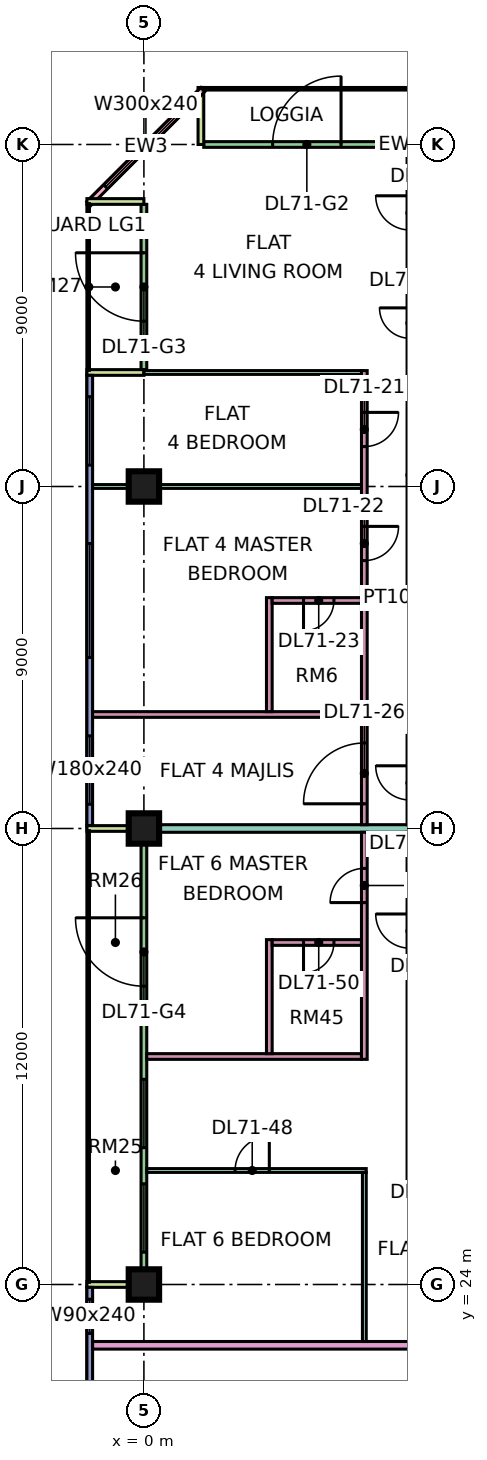
"""IFC4 building model, lengths in metres.
Left out: names, types, materials, properties, quantities, classifications, styles, units other than length and angle.
Written with IfcOpenShell. Run it as: python <this file> out.ifc"""

import sys

from ifc_helpers import new_model, si_unit, direction, frame, frame_2d, origin, origin_2d, place, context, subcontext, project, spatial, rectangle, extrude, element, fill, save


model = new_model("IFC4")
c1 = context("Model", 3, precision=1e-05, world=origin(), true_north=direction((0.0, 1.0)))
c2 = subcontext(c1, "Body", "Model", "MODEL_VIEW")
j1 = project(units=[si_unit("LENGTHUNIT", "METRE"), si_unit("PLANEANGLEUNIT", "RADIAN")], contexts=[c1])
p1 = place(None, origin())
s1 = spatial("IfcSite", under=j1, at=p1, CompositionType="ELEMENT")
p2 = place(p1, origin())
s2 = spatial("IfcBuilding", under=s1, at=p2, CompositionType="ELEMENT")
p3 = place(p2, frame((0.0, 0.0, 303.4)))
s3 = spatial("IfcBuildingStorey", under=s2, at=p3, CompositionType="ELEMENT", Elevation=303.4)
p4 = place(p3, frame((0.0, 24.0, 0.0), z_axis=(0.0, 0.0, 1.0), x_axis=(1.0, 0.0, 0.0)))
e1 = element("IfcColumn", 1, at=p4, inside=s3, PredefinedType="COLUMN", context=c2, shape_type="SweptSolid", body=[
    extrude(rectangle(XDim=0.8, YDim=0.8, at=origin_2d()), origin(), (0.0, 0.0, 1.0), 3.75),
])
p5 = place(p3, frame((0.0, 36.0, 0.0), z_axis=(0.0, 0.0, 1.0), x_axis=(1.0, 0.0, 0.0)))
e2 = element("IfcColumn", 2, at=p5, inside=s3, PredefinedType="COLUMN", context=c2, shape_type="SweptSolid", body=[
    extrude(rectangle(XDim=0.8, YDim=0.8, at=origin_2d()), origin(), (0.0, 0.0, 1.0), 3.75),
])
p6 = place(p3, frame((0.0, 45.0, 0.0), z_axis=(0.0, 0.0, 1.0), x_axis=(1.0, 0.0, 0.0)))
e3 = element("IfcColumn", 3, at=p6, inside=s3, PredefinedType="COLUMN", context=c2, shape_type="SweptSolid", body=[
    extrude(rectangle(XDim=0.8, YDim=0.8, at=origin_2d()), origin(), (0.0, 0.0, 1.0), 3.75),
])
p7 = place(p3, frame((11.925, 54.0, 0.0), z_axis=(0.0, 0.0, 1.0), x_axis=(-1.0, 0.0, 0.0)))
e4 = element("IfcWall", 4, at=p7, inside=s3, PredefinedType="SOLIDWALL", context=c2, shape_type="SweptSolid", body=[
    extrude(rectangle(XDim=10.35, YDim=0.15, at=frame_2d((5.175, 0.0))), origin(), (0.0, 0.0, 1.0), 3.35),
])
p8 = place(p7, frame((6.738, 0.0, 0.0)))
e5 = element("IfcOpeningElement", 5, at=p8, cuts=e4, PredefinedType="OPENING", context=c2, shape_type="SweptSolid", body=[
    extrude(rectangle(XDim=1.8, YDim=2.4, at=frame_2d((0.9, 1.2))), frame((0.0, 0.085, 0.0), z_axis=(0.0, -1.0, 0.0), x_axis=(1.0, 0.0, 0.0)), (0.0, 0.0, 1.0), 0.17),
])
p9 = place(p3, frame((1.5, 55.5, 0.0), z_axis=(0.0, 0.0, 1.0), x_axis=(0.0, -1.0, 0.0)))
e6 = element("IfcWall", 6, at=p9, inside=s3, PredefinedType="SOLIDWALL", context=c2, shape_type="SweptSolid", body=[
    extrude(rectangle(XDim=1.5, YDim=0.15, at=frame_2d((0.75, 0.0))), origin(), (0.0, 0.0, 1.0), 3.35),
])
p10 = place(p3, frame((1.553, 55.447, 0.0), z_axis=(0.0, 0.0, 1.0), x_axis=(-0.707106781187, -0.707106781187, 0.0)))
e7 = element("IfcWall", 7, at=p10, inside=s3, PredefinedType="SOLIDWALL", context=c2, shape_type="SweptSolid", body=[
    extrude(rectangle(XDim=4.243, YDim=0.15, at=frame_2d((2.121, 0.0))), origin(), (0.0, 0.0, 1.0), 3.35),
])
p11 = place(p10, frame((0.621, 0.0, 0.45)))
e8 = element("IfcOpeningElement", 8, at=p11, cuts=e7, PredefinedType="OPENING", context=c2, shape_type="SweptSolid", body=[
    extrude(rectangle(XDim=3.0, YDim=2.4, at=frame_2d((1.5, 1.2))), frame((0.0, 0.085, 0.0), z_axis=(0.0, -1.0, 0.0), x_axis=(1.0, 0.0, 0.0)), (0.0, 0.0, 1.0), 0.17),
])
p12 = place(p3, frame((0.0, 52.425, 0.0), z_axis=(0.0, 0.0, 1.0), x_axis=(0.0, -1.0, 0.0)))
e9 = element("IfcWall", 9, at=p12, inside=s3, PredefinedType="SOLIDWALL", context=c2, shape_type="SweptSolid", body=[
    extrude(rectangle(XDim=4.35, YDim=0.15, at=frame_2d((2.175, 0.0))), origin(), (0.0, 0.0, 1.0), 3.35),
])
p13 = place(p12, frame((1.275, 0.0, 0.0)))
e10 = element("IfcOpeningElement", 10, at=p13, cuts=e9, PredefinedType="OPENING", context=c2, shape_type="SweptSolid", body=[
    extrude(rectangle(XDim=1.8, YDim=2.4, at=frame_2d((0.9, 1.2))), frame((0.0, 0.085, 0.0), z_axis=(0.0, -1.0, 0.0), x_axis=(1.0, 0.0, 0.0)), (0.0, 0.0, 1.0), 0.17),
])
for number, where, z_axis, x_axis in (
    (11, (-1.5, 52.5, 0.0), (0.0, 0.0, 1.0), (1.0, 0.0, 0.0)),
    (12, (-1.5, 48.0, 0.0), (0.0, 0.0, 1.0), (1.0, 0.0, 0.0)),
):
    element("IfcWall", number, at=place(p3, frame(where, z_axis=z_axis, x_axis=x_axis)), inside=s3, PredefinedType="SOLIDWALL", context=c2, shape_type="SweptSolid", body=[
        extrude(rectangle(XDim=1.5, YDim=0.15, at=frame_2d((0.75, 0.0))), origin(), (0.0, 0.0, 1.0), 3.35),
    ])
p14 = place(p3, frame((-1.425, 47.925, 0.0), z_axis=(0.0, 0.0, 1.0), x_axis=(0.0, -1.0, 0.0)))
e13 = element("IfcWall", 13, at=p14, inside=s3, PredefinedType="SOLIDWALL", context=c2, shape_type="SweptSolid", body=[
    extrude(rectangle(XDim=11.85, YDim=0.15, at=frame_2d((5.925, 0.0))), origin(), (0.0, 0.0, 1.0), 3.35),
])
p15 = place(p14, frame((0.562, 0.0, 0.45)))
e14 = element("IfcOpeningElement", 14, at=p15, cuts=e13, PredefinedType="OPENING", context=c2, shape_type="SweptSolid", body=[
    extrude(rectangle(XDim=1.8, YDim=2.4, at=frame_2d((0.9, 1.2))), frame((0.0, 0.085, 0.0), z_axis=(0.0, -1.0, 0.0), x_axis=(1.0, 0.0, 0.0)), (0.0, 0.0, 1.0), 0.17),
])
p16 = place(p14, frame((4.425, 0.0, 0.45)))
e15 = element("IfcOpeningElement", 15, at=p16, cuts=e13, PredefinedType="OPENING", context=c2, shape_type="SweptSolid", body=[
    extrude(rectangle(XDim=3.0, YDim=2.4, at=frame_2d((1.5, 1.2))), frame((0.0, 0.085, 0.0), z_axis=(0.0, -1.0, 0.0), x_axis=(1.0, 0.0, 0.0)), (0.0, 0.0, 1.0), 0.17),
])
p17 = place(p14, frame((9.488, 0.0, 0.45)))
e16 = element("IfcOpeningElement", 16, at=p17, cuts=e13, PredefinedType="OPENING", context=c2, shape_type="SweptSolid", body=[
    extrude(rectangle(XDim=1.8, YDim=2.4, at=frame_2d((0.9, 1.2))), frame((0.0, 0.085, 0.0), z_axis=(0.0, -1.0, 0.0), x_axis=(1.0, 0.0, 0.0)), (0.0, 0.0, 1.0), 0.17),
])
p18 = place(p3, frame((0.0, 35.925, 0.0), z_axis=(0.0, 0.0, 1.0), x_axis=(0.0, -1.0, 0.0)))
e17 = element("IfcWall", 17, at=p18, inside=s3, PredefinedType="SOLIDWALL", context=c2, shape_type="SweptSolid", body=[
    extrude(rectangle(XDim=11.85, YDim=0.15, at=frame_2d((5.925, 0.0))), origin(), (0.0, 0.0, 1.0), 3.35),
])
p19 = place(p18, frame((2.275, 0.0, 0.0)))
e18 = element("IfcOpeningElement", 18, at=p19, cuts=e17, PredefinedType="OPENING", context=c2, shape_type="SweptSolid", body=[
    extrude(rectangle(XDim=1.8, YDim=2.4, at=frame_2d((0.9, 1.2))), frame((0.0, 0.085, 0.0), z_axis=(0.0, -1.0, 0.0), x_axis=(1.0, 0.0, 0.0)), (0.0, 0.0, 1.0), 0.17),
])
p20 = place(p18, frame((6.525, 0.0, 0.45)))
e19 = element("IfcOpeningElement", 19, at=p20, cuts=e17, PredefinedType="OPENING", context=c2, shape_type="SweptSolid", body=[
    extrude(rectangle(XDim=1.8, YDim=2.4, at=frame_2d((0.9, 1.2))), frame((0.0, 0.085, 0.0), z_axis=(0.0, -1.0, 0.0), x_axis=(1.0, 0.0, 0.0)), (0.0, 0.0, 1.0), 0.17),
])
p21 = place(p18, frame((9.275, 0.0, 0.45)))
e20 = element("IfcOpeningElement", 20, at=p21, cuts=e17, PredefinedType="OPENING", context=c2, shape_type="SweptSolid", body=[
    extrude(rectangle(XDim=1.8, YDim=2.4, at=frame_2d((0.9, 1.2))), frame((0.0, 0.085, 0.0), z_axis=(0.0, -1.0, 0.0), x_axis=(1.0, 0.0, 0.0)), (0.0, 0.0, 1.0), 0.17),
])
for number, where, z_axis, x_axis in (
    (21, (-1.5, 36.0, 0.0), (0.0, 0.0, 1.0), (1.0, 0.0, 0.0)),
    (22, (-1.5, 24.0, 0.0), (0.0, 0.0, 1.0), (1.0, 0.0, 0.0)),
):
    element("IfcWall", number, at=place(p3, frame(where, z_axis=z_axis, x_axis=x_axis)), inside=s3, PredefinedType="SOLIDWALL", context=c2, shape_type="SweptSolid", body=[
        extrude(rectangle(XDim=1.5, YDim=0.15, at=frame_2d((0.75, 0.0))), origin(), (0.0, 0.0, 1.0), 3.35),
    ])
p22 = place(p3, frame((-1.425, 23.925, 0.0), z_axis=(0.0, 0.0, 1.0), x_axis=(0.0, -1.0, 0.0)))
e23 = element("IfcWall", 23, at=p22, inside=s3, PredefinedType="SOLIDWALL", context=c2, shape_type="SweptSolid", body=[
    extrude(rectangle(XDim=11.425, YDim=0.15, at=frame_2d((5.712, 0.0))), origin(), (0.0, 0.0, 1.0), 3.35),
])
p23 = place(p22, frame((0.312, 0.0, 0.45)))
e24 = element("IfcOpeningElement", 24, at=p23, cuts=e23, PredefinedType="OPENING", context=c2, shape_type="SweptSolid", body=[
    extrude(rectangle(XDim=0.9, YDim=2.4, at=frame_2d((0.45, 1.2))), frame((0.0, 0.085, 0.0), z_axis=(0.0, -1.0, 0.0), x_axis=(1.0, 0.0, 0.0)), (0.0, 0.0, 1.0), 0.17),
])
p24 = place(p22, frame((6.175, 0.0, 0.45)))
e25 = element("IfcOpeningElement", 25, at=p24, cuts=e23, PredefinedType="OPENING", context=c2, shape_type="SweptSolid", body=[
    extrude(rectangle(XDim=3.0, YDim=2.4, at=frame_2d((1.5, 1.2))), frame((0.0, 0.085, 0.0), z_axis=(0.0, -1.0, 0.0), x_axis=(1.0, 0.0, 0.0)), (0.0, 0.0, 1.0), 0.17),
])
p25 = place(p3, frame((-1.351, 39.0, 0.0), z_axis=(0.0, 0.0, 1.0), x_axis=(1.0, 0.0, 0.0)))
e26 = element("IfcWall", 26, at=p25, inside=s3, PredefinedType="PARTITIONING", context=c2, shape_type="SweptSolid", body=[
    extrude(rectangle(XDim=7.076, YDim=0.15, at=frame_2d((3.538, 0.0))), origin(), (0.0, 0.0, 1.0), 3.35),
])
p26 = place(p3, frame((-1.351, 45.0, 0.0), z_axis=(0.0, 0.0, 1.0), x_axis=(1.0, 0.0, 0.0)))
e27 = element("IfcWall", 27, at=p26, inside=s3, PredefinedType="PARTITIONING", context=c2, shape_type="SweptSolid", body=[
    extrude(rectangle(XDim=7.076, YDim=0.1, at=frame_2d((3.538, 0.0))), origin(), (0.0, 0.0, 1.0), 3.35),
])
p27 = place(p3, frame((-1.35, 22.4, 0.0), z_axis=(0.0, 0.0, 1.0), x_axis=(1.0, 0.0, 0.0)))
e28 = element("IfcWall", 28, at=p27, inside=s3, PredefinedType="PARTITIONING", context=c2, shape_type="SweptSolid", body=[
    extrude(rectangle(XDim=13.65, YDim=0.2, at=frame_2d((6.825, 0.0))), origin(), (0.0, 0.0, 1.0), 3.35),
])
e29 = element("IfcWall", 29, at=p5, inside=s3, PredefinedType="PARTITIONING", context=c2, shape_type="SweptSolid", body=[
    extrude(rectangle(XDim=12.3, YDim=0.2, at=frame_2d((6.15, 0.0))), origin(), (0.0, 0.0, 1.0), 3.35),
])
p28 = place(p3, frame((0.0, 48.0, 0.0), z_axis=(0.0, 0.0, 1.0), x_axis=(1.0, 0.0, 0.0)))
e30 = element("IfcWall", 30, at=p28, inside=s3, PredefinedType="PARTITIONING", context=c2, shape_type="SweptSolid", body=[
    extrude(rectangle(XDim=5.725, YDim=0.1, at=frame_2d((2.863, 0.0))), origin(), (0.0, 0.0, 1.0), 3.35),
])
p29 = place(p3, frame((0.074, 27.0, 0.0), z_axis=(0.0, 0.0, 1.0), x_axis=(1.0, 0.0, 0.0)))
e31 = element("IfcWall", 31, at=p29, inside=s3, PredefinedType="PARTITIONING", context=c2, shape_type="SweptSolid", body=[
    extrude(rectangle(XDim=5.776, YDim=0.1, at=frame_2d((2.888, 0.0))), origin(), (0.0, 0.0, 1.0), 3.35),
])
p30 = place(p29, frame((2.326, 0.0, 0.0)))
e32 = element("IfcOpeningElement", 32, at=p30, cuts=e31, PredefinedType="OPENING", context=c2, shape_type="SweptSolid", body=[
    extrude(rectangle(XDim=0.9, YDim=2.1, at=frame_2d((0.45, 1.05))), frame((0.0, 0.06, 0.0), z_axis=(0.0, -1.0, 0.0), x_axis=(1.0, 0.0, 0.0)), (0.0, 0.0, 1.0), 0.12),
])
p31 = place(p3, frame((0.074, 30.0, 0.0), z_axis=(0.0, 0.0, 1.0), x_axis=(1.0, 0.0, 0.0)))
e33 = element("IfcWall", 33, at=p31, inside=s3, PredefinedType="PARTITIONING", context=c2, shape_type="SweptSolid", body=[
    extrude(rectangle(XDim=5.651, YDim=0.15, at=frame_2d((2.826, 0.0))), origin(), (0.0, 0.0, 1.0), 3.35),
])
for number, where, z_axis, x_axis in (
    (34, (3.3, 30.075, 0.0), (0.0, 0.0, 1.0), (0.0, 1.0, 0.0)),
    (35, (3.3, 39.075, 0.0), (0.0, 0.0, 1.0), (0.0, 1.0, 0.0)),
):
    element("IfcWall", number, at=place(p3, frame(where, z_axis=z_axis, x_axis=x_axis)), inside=s3, PredefinedType="PARTITIONING", context=c2, shape_type="SweptSolid", body=[
        extrude(rectangle(XDim=3.0, YDim=0.15, at=frame_2d((1.5, 0.0))), origin(), (0.0, 0.0, 1.0), 3.35),
    ])
p32 = place(p3, frame((3.375, 33.0, 0.0), z_axis=(0.0, 0.0, 1.0), x_axis=(1.0, 0.0, 0.0)))
e36 = element("IfcWall", 36, at=p32, inside=s3, PredefinedType="PARTITIONING", context=c2, shape_type="SweptSolid", body=[
    extrude(rectangle(XDim=2.35, YDim=0.15, at=frame_2d((1.175, 0.0))), origin(), (0.0, 0.0, 1.0), 3.35),
])
p33 = place(p32, frame((0.825, 0.0, 0.0)))
e37 = element("IfcOpeningElement", 37, at=p33, cuts=e36, PredefinedType="OPENING", context=c2, shape_type="SweptSolid", body=[
    extrude(rectangle(XDim=0.8, YDim=2.1, at=frame_2d((0.4, 1.05))), frame((0.0, 0.085, 0.0), z_axis=(0.0, -1.0, 0.0), x_axis=(1.0, 0.0, 0.0)), (0.0, 0.0, 1.0), 0.17),
])
p34 = place(p3, frame((3.375, 42.0, 0.0), z_axis=(0.0, 0.0, 1.0), x_axis=(1.0, 0.0, 0.0)))
e38 = element("IfcWall", 38, at=p34, inside=s3, PredefinedType="PARTITIONING", context=c2, shape_type="SweptSolid", body=[
    extrude(rectangle(XDim=2.35, YDim=0.15, at=frame_2d((1.175, 0.0))), origin(), (0.0, 0.0, 1.0), 3.35),
])
p35 = place(p34, frame((0.825, 0.0, 0.0)))
e39 = element("IfcOpeningElement", 39, at=p35, cuts=e38, PredefinedType="OPENING", context=c2, shape_type="SweptSolid", body=[
    extrude(rectangle(XDim=0.8, YDim=2.1, at=frame_2d((0.4, 1.05))), frame((0.0, 0.085, 0.0), z_axis=(0.0, -1.0, 0.0), x_axis=(1.0, 0.0, 0.0)), (0.0, 0.0, 1.0), 0.17),
])
p36 = place(p3, frame((5.8, 22.5, 0.0), z_axis=(0.0, 0.0, 1.0), x_axis=(0.0, 1.0, 0.0)))
e40 = element("IfcWall", 40, at=p36, inside=s3, PredefinedType="PARTITIONING", context=c2, shape_type="SweptSolid", body=[
    extrude(rectangle(XDim=4.45, YDim=0.1, at=frame_2d((2.225, 0.0))), origin(), (0.0, 0.0, 1.0), 3.35),
])
p37 = place(p3, frame((5.8, 29.925, 0.0), z_axis=(0.0, 0.0, 1.0), x_axis=(0.0, 1.0, 0.0)))
e41 = element("IfcWall", 41, at=p37, inside=s3, PredefinedType="PARTITIONING", context=c2, shape_type="SweptSolid", body=[
    extrude(rectangle(XDim=5.975, YDim=0.15, at=frame_2d((2.987, 0.0))), origin(), (0.0, 0.0, 1.0), 3.35),
])
p38 = place(p37, frame((4.125, 0.0, 0.0)))
e42 = element("IfcOpeningElement", 42, at=p38, cuts=e41, PredefinedType="OPENING", context=c2, shape_type="SweptSolid", body=[
    extrude(rectangle(XDim=0.9, YDim=2.1, at=frame_2d((0.45, 1.05))), frame((0.0, 0.085, 0.0), z_axis=(0.0, -1.0, 0.0), x_axis=(1.0, 0.0, 0.0)), (0.0, 0.0, 1.0), 0.17),
])
p39 = place(p3, frame((5.8, 36.1, 0.0), z_axis=(0.0, 0.0, 1.0), x_axis=(0.0, 1.0, 0.0)))
e43 = element("IfcWall", 43, at=p39, inside=s3, PredefinedType="PARTITIONING", context=c2, shape_type="SweptSolid", body=[
    extrude(rectangle(XDim=11.95, YDim=0.15, at=frame_2d((5.975, 0.0))), origin(), (0.0, 0.0, 1.0), 3.35),
])
p40 = place(p39, frame((9.95, 0.0, 0.0)))
e44 = element("IfcOpeningElement", 44, at=p40, cuts=e43, PredefinedType="OPENING", context=c2, shape_type="SweptSolid", body=[
    extrude(rectangle(XDim=0.9, YDim=2.1, at=frame_2d((0.45, 1.05))), frame((0.0, 0.085, 0.0), z_axis=(0.0, -1.0, 0.0), x_axis=(1.0, 0.0, 0.0)), (0.0, 0.0, 1.0), 0.17),
])
p41 = place(p39, frame((6.95, 0.0, 0.0)))
e45 = element("IfcOpeningElement", 45, at=p41, cuts=e43, PredefinedType="OPENING", context=c2, shape_type="SweptSolid", body=[
    extrude(rectangle(XDim=0.9, YDim=2.1, at=frame_2d((0.45, 1.05))), frame((0.0, 0.085, 0.0), z_axis=(0.0, -1.0, 0.0), x_axis=(1.0, 0.0, 0.0)), (0.0, 0.0, 1.0), 0.17),
])
p42 = place(p39, frame((0.55, 0.0, 0.0)))
e46 = element("IfcOpeningElement", 46, at=p42, cuts=e43, PredefinedType="OPENING", context=c2, shape_type="SweptSolid", body=[
    extrude(rectangle(XDim=1.6, YDim=2.1, at=frame_2d((0.8, 1.05))), frame((0.0, 0.085, 0.0), z_axis=(0.0, -1.0, 0.0), x_axis=(1.0, 0.0, 0.0)), (0.0, 0.0, 1.0), 0.17),
])
p43 = place(p8, frame((1.8, 0.0, 0.0), z_axis=(0.0, 0.0, 1.0), x_axis=(-1.0, 0.0, 0.0)))
e47 = element("IfcDoor", 47, at=p43, inside=s3, OperationType="DOUBLE_DOOR_SINGLE_SWING", PredefinedType="DOOR", context=c2, shape_type="SweptSolid", body=[
    extrude(rectangle(XDim=1.8, YDim=2.4, at=frame_2d((0.9, 1.2))), frame((0.0, 0.025, 0.0), z_axis=(0.0, -1.0, 0.0), x_axis=(1.0, 0.0, 0.0)), (0.0, 0.0, 1.0), 0.05),
])
fill(e5, e47)
p44 = place(p11, origin())
e48 = element("IfcWindow", 48, at=p44, inside=s3, PartitioningType="SINGLE_PANEL", PredefinedType="WINDOW", context=c2, shape_type="SweptSolid", body=[
    extrude(rectangle(XDim=3.0, YDim=2.4, at=frame_2d((1.5, 1.2))), frame((0.0, 0.03, 0.0), z_axis=(0.0, -1.0, 0.0), x_axis=(1.0, 0.0, 0.0)), (0.0, 0.0, 1.0), 0.06),
])
fill(e8, e48)
p45 = place(p13, frame((1.8, 0.0, 0.0), z_axis=(0.0, 0.0, 1.0), x_axis=(-1.0, 0.0, 0.0)))
e49 = element("IfcDoor", 49, at=p45, inside=s3, OperationType="DOUBLE_DOOR_SINGLE_SWING", PredefinedType="DOOR", context=c2, shape_type="SweptSolid", body=[
    extrude(rectangle(XDim=1.8, YDim=2.4, at=frame_2d((0.9, 1.2))), frame((0.0, 0.025, 0.0), z_axis=(0.0, -1.0, 0.0), x_axis=(1.0, 0.0, 0.0)), (0.0, 0.0, 1.0), 0.05),
])
fill(e10, e49)
p46 = place(p15, origin())
e50 = element("IfcWindow", 50, at=p46, inside=s3, PartitioningType="SINGLE_PANEL", PredefinedType="WINDOW", context=c2, shape_type="SweptSolid", body=[
    extrude(rectangle(XDim=1.8, YDim=2.4, at=frame_2d((0.9, 1.2))), frame((0.0, 0.03, 0.0), z_axis=(0.0, -1.0, 0.0), x_axis=(1.0, 0.0, 0.0)), (0.0, 0.0, 1.0), 0.06),
])
fill(e14, e50)
p47 = place(p16, origin())
e51 = element("IfcWindow", 51, at=p47, inside=s3, PartitioningType="SINGLE_PANEL", PredefinedType="WINDOW", context=c2, shape_type="SweptSolid", body=[
    extrude(rectangle(XDim=3.0, YDim=2.4, at=frame_2d((1.5, 1.2))), frame((0.0, 0.03, 0.0), z_axis=(0.0, -1.0, 0.0), x_axis=(1.0, 0.0, 0.0)), (0.0, 0.0, 1.0), 0.06),
])
fill(e15, e51)
p48 = place(p17, origin())
e52 = element("IfcWindow", 52, at=p48, inside=s3, PartitioningType="SINGLE_PANEL", PredefinedType="WINDOW", context=c2, shape_type="SweptSolid", body=[
    extrude(rectangle(XDim=1.8, YDim=2.4, at=frame_2d((0.9, 1.2))), frame((0.0, 0.03, 0.0), z_axis=(0.0, -1.0, 0.0), x_axis=(1.0, 0.0, 0.0)), (0.0, 0.0, 1.0), 0.06),
])
fill(e16, e52)
p49 = place(p19, frame((1.8, 0.0, 0.0), z_axis=(0.0, 0.0, 1.0), x_axis=(-1.0, 0.0, 0.0)))
e53 = element("IfcDoor", 53, at=p49, inside=s3, OperationType="DOUBLE_DOOR_SINGLE_SWING", PredefinedType="DOOR", context=c2, shape_type="SweptSolid", body=[
    extrude(rectangle(XDim=1.8, YDim=2.4, at=frame_2d((0.9, 1.2))), frame((0.0, 0.025, 0.0), z_axis=(0.0, -1.0, 0.0), x_axis=(1.0, 0.0, 0.0)), (0.0, 0.0, 1.0), 0.05),
])
fill(e18, e53)
p50 = place(p20, origin())
e54 = element("IfcWindow", 54, at=p50, inside=s3, PartitioningType="SINGLE_PANEL", PredefinedType="WINDOW", context=c2, shape_type="SweptSolid", body=[
    extrude(rectangle(XDim=1.8, YDim=2.4, at=frame_2d((0.9, 1.2))), frame((0.0, 0.03, 0.0), z_axis=(0.0, -1.0, 0.0), x_axis=(1.0, 0.0, 0.0)), (0.0, 0.0, 1.0), 0.06),
])
fill(e19, e54)
p51 = place(p21, origin())
e55 = element("IfcWindow", 55, at=p51, inside=s3, PartitioningType="SINGLE_PANEL", PredefinedType="WINDOW", context=c2, shape_type="SweptSolid", body=[
    extrude(rectangle(XDim=1.8, YDim=2.4, at=frame_2d((0.9, 1.2))), frame((0.0, 0.03, 0.0), z_axis=(0.0, -1.0, 0.0), x_axis=(1.0, 0.0, 0.0)), (0.0, 0.0, 1.0), 0.06),
])
fill(e20, e55)
p52 = place(p23, origin())
e56 = element("IfcWindow", 56, at=p52, inside=s3, PartitioningType="SINGLE_PANEL", PredefinedType="WINDOW", context=c2, shape_type="SweptSolid", body=[
    extrude(rectangle(XDim=0.9, YDim=2.4, at=frame_2d((0.45, 1.2))), frame((0.0, 0.03, 0.0), z_axis=(0.0, -1.0, 0.0), x_axis=(1.0, 0.0, 0.0)), (0.0, 0.0, 1.0), 0.06),
])
fill(e24, e56)
p53 = place(p40, origin())
e57 = element("IfcDoor", 57, at=p53, inside=s3, OperationType="SINGLE_SWING_RIGHT", PredefinedType="DOOR", context=c2, shape_type="SweptSolid", body=[
    extrude(rectangle(XDim=0.9, YDim=2.1, at=frame_2d((0.45, 1.05))), frame((0.0, 0.025, 0.0), z_axis=(0.0, -1.0, 0.0), x_axis=(1.0, 0.0, 0.0)), (0.0, 0.0, 1.0), 0.05),
])
fill(e44, e57)
p54 = place(p41, origin())
e58 = element("IfcDoor", 58, at=p54, inside=s3, OperationType="SINGLE_SWING_RIGHT", PredefinedType="DOOR", context=c2, shape_type="SweptSolid", body=[
    extrude(rectangle(XDim=0.9, YDim=2.1, at=frame_2d((0.45, 1.05))), frame((0.0, 0.025, 0.0), z_axis=(0.0, -1.0, 0.0), x_axis=(1.0, 0.0, 0.0)), (0.0, 0.0, 1.0), 0.05),
])
fill(e45, e58)
p55 = place(p35, frame((0.8, 0.0, 0.0), z_axis=(0.0, 0.0, 1.0), x_axis=(-1.0, 0.0, 0.0)))
e59 = element("IfcDoor", 59, at=p55, inside=s3, OperationType="SINGLE_SWING_LEFT", PredefinedType="DOOR", context=c2, shape_type="SweptSolid", body=[
    extrude(rectangle(XDim=0.8, YDim=2.1, at=frame_2d((0.4, 1.05))), frame((0.0, 0.025, 0.0), z_axis=(0.0, -1.0, 0.0), x_axis=(1.0, 0.0, 0.0)), (0.0, 0.0, 1.0), 0.05),
])
fill(e39, e59)
p56 = place(p42, origin())
e60 = element("IfcDoor", 60, at=p56, inside=s3, OperationType="DOUBLE_DOOR_SINGLE_SWING", PredefinedType="DOOR", context=c2, shape_type="SweptSolid", body=[
    extrude(rectangle(XDim=1.6, YDim=2.1, at=frame_2d((0.8, 1.05))), frame((0.0, 0.025, 0.0), z_axis=(0.0, -1.0, 0.0), x_axis=(1.0, 0.0, 0.0)), (0.0, 0.0, 1.0), 0.05),
])
fill(e46, e60)
p57 = place(p30, frame((0.9, 0.0, 0.0), z_axis=(0.0, 0.0, 1.0), x_axis=(-1.0, 0.0, 0.0)))
e61 = element("IfcDoor", 61, at=p57, inside=s3, OperationType="SINGLE_SWING_RIGHT", PredefinedType="DOOR", context=c2, shape_type="SweptSolid", body=[
    extrude(rectangle(XDim=0.9, YDim=2.1, at=frame_2d((0.45, 1.05))), frame((0.0, 0.025, 0.0), z_axis=(0.0, -1.0, 0.0), x_axis=(1.0, 0.0, 0.0)), (0.0, 0.0, 1.0), 0.05),
])
fill(e32, e61)
p58 = place(p38, origin())
e62 = element("IfcDoor", 62, at=p58, inside=s3, OperationType="SINGLE_SWING_LEFT", PredefinedType="DOOR", context=c2, shape_type="SweptSolid", body=[
    extrude(rectangle(XDim=0.9, YDim=2.1, at=frame_2d((0.45, 1.05))), frame((0.0, 0.025, 0.0), z_axis=(0.0, -1.0, 0.0), x_axis=(1.0, 0.0, 0.0)), (0.0, 0.0, 1.0), 0.05),
])
fill(e42, e62)
p59 = place(p33, frame((0.8, 0.0, 0.0), z_axis=(0.0, 0.0, 1.0), x_axis=(-1.0, 0.0, 0.0)))
e63 = element("IfcDoor", 63, at=p59, inside=s3, OperationType="SINGLE_SWING_LEFT", PredefinedType="DOOR", context=c2, shape_type="SweptSolid", body=[
    extrude(rectangle(XDim=0.8, YDim=2.1, at=frame_2d((0.4, 1.05))), frame((0.0, 0.025, 0.0), z_axis=(0.0, -1.0, 0.0), x_axis=(1.0, 0.0, 0.0)), (0.0, 0.0, 1.0), 0.05),
])
fill(e37, e63)
save(model, sys.argv[1])
